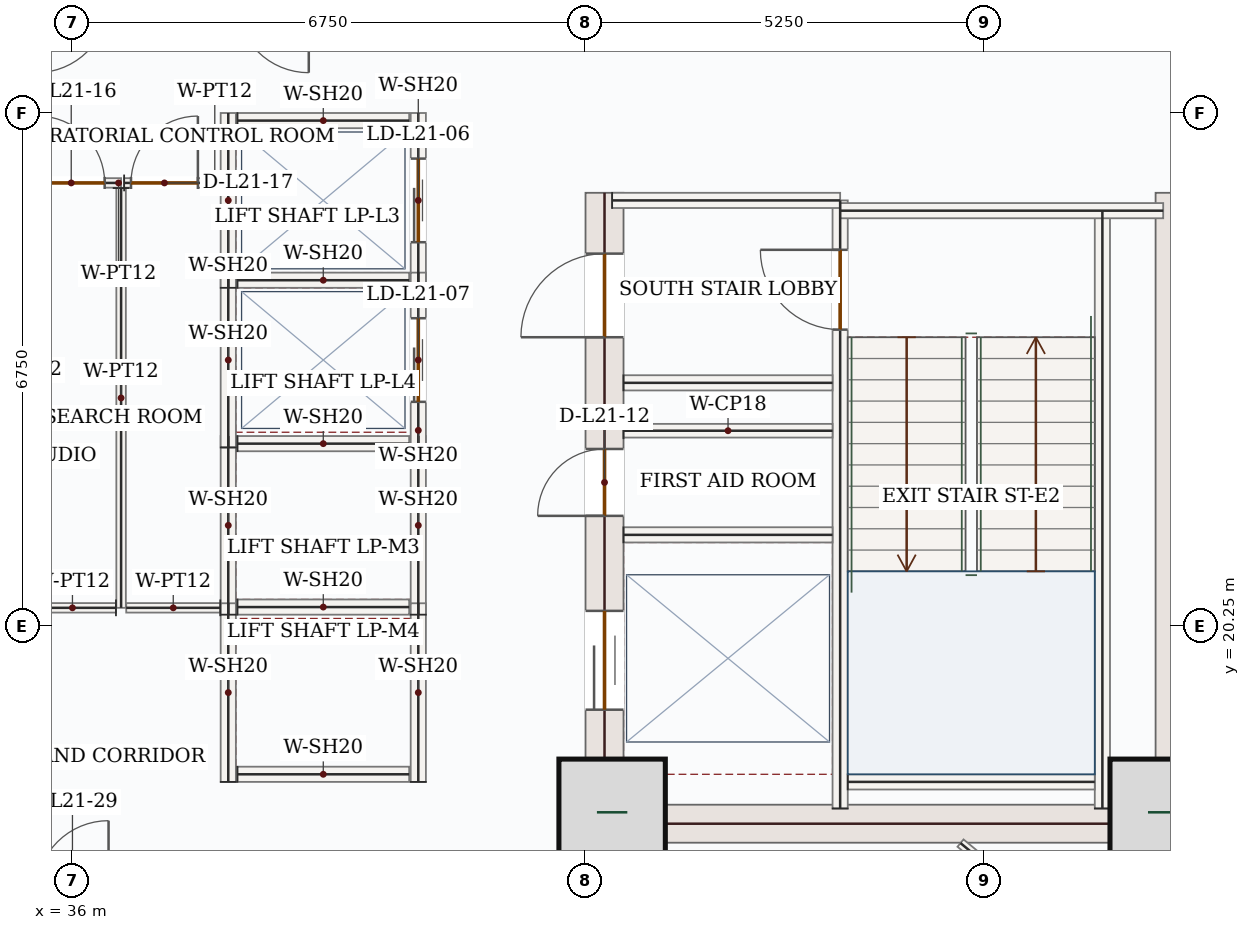
"""IFC4 building model, lengths in metres.
Left out: names, types, materials, properties, quantities, classifications, styles, units other than length and angle.
Written with IfcOpenShell. Run it as: python <this file> out.ifc"""

import sys

from ifc_helpers import new_model, si_unit, direction, frame, frame_2d, origin, origin_2d, place, context, subcontext, project, spatial, rectangle, extrude, source, transform, mapped, element, fill, save


model = new_model("IFC4")
c1 = context("Model", 3, precision=1e-05, world=origin(), true_north=direction((0.0, 1.0)))
c2 = subcontext(c1, "Body", "Model", "MODEL_VIEW")
j1 = project(units=[si_unit("LENGTHUNIT", "METRE"), si_unit("PLANEANGLEUNIT", "RADIAN")], contexts=[c1])
p1 = place(None, origin())
s1 = spatial("IfcSite", under=j1, at=p1, CompositionType="ELEMENT")
p2 = place(p1, origin())
s2 = spatial("IfcBuilding", under=s1, at=p2, CompositionType="ELEMENT")
p3 = place(p2, frame((0.0, 0.0, 96.3)))
s3 = spatial("IfcBuildingStorey", under=s2, at=p3, CompositionType="ELEMENT", Elevation=96.3)
p4 = place(p3, frame((43.0, 17.4, 0.0), z_axis=(0.0, 0.0, 1.0), x_axis=(0.0, 1.0, 0.0)))
e1 = element("IfcWall", 1, at=p4, inside=s3, PredefinedType="SHEAR", context=c2, shape_type="SweptSolid", body=[
    extrude(rectangle(XDim=8.55, YDim=0.5, at=frame_2d((4.275, 0.0))), origin(), (0.0, 0.0, 1.0), 3.95),
])
p5 = place(p4, frame((6.65, 0.0, 0.0)))
e2 = element("IfcOpeningElement", 2, at=p5, cuts=e1, PredefinedType="OPENING", context=c2, shape_type="SweptSolid", body=[
    extrude(rectangle(XDim=1.1, YDim=2.2, at=frame_2d((0.55, 1.1))), frame((0.0, 0.26, 0.0), z_axis=(0.0, -1.0, 0.0), x_axis=(1.0, 0.0, 0.0)), (0.0, 0.0, 1.0), 0.52),
])
p6 = place(p4, frame((1.75, 0.0, 0.0)))
e3 = element("IfcOpeningElement", 3, at=p6, cuts=e1, PredefinedType="OPENING", context=c2, shape_type="SweptSolid", body=[
    extrude(rectangle(XDim=1.3, YDim=2.2, at=frame_2d((0.65, 1.1))), frame((0.0, 0.26, 0.0), z_axis=(0.0, -1.0, 0.0), x_axis=(1.0, 0.0, 0.0)), (0.0, 0.0, 1.0), 0.52),
])
p7 = place(p4, frame((4.3, 0.0, 0.0)))
e4 = element("IfcOpeningElement", 4, at=p7, cuts=e1, PredefinedType="OPENING", context=c2, shape_type="SweptSolid", body=[
    extrude(rectangle(XDim=0.88, YDim=2.1, at=frame_2d((0.44, 1.05))), frame((0.0, 0.26, 0.0), z_axis=(0.0, -1.0, 0.0), x_axis=(1.0, 0.0, 0.0)), (0.0, 0.0, 1.0), 0.52),
])
m1 = source(origin(), c2, "Body", "SweptSolid", [
    extrude(rectangle(XDim=8.55, YDim=0.5, at=frame_2d((4.275, 0.0))), origin(), (0.0, 0.0, 1.0), 3.95),
])
p8 = place(p3, frame((50.5, 17.4, 0.0), z_axis=(0.0, 0.0, 1.0), x_axis=(0.0, 1.0, 0.0)))
e5 = element("IfcWall", 5, at=p8, inside=s3, PredefinedType="SHEAR", context=c2, shape_type="MappedRepresentation", body=[
    mapped(m1, transform((0.0, 0.0, 0.0), x_axis=(1.0, 0.0, 0.0), y_axis=(0.0, 1.0, 0.0), z_axis=(0.0, 0.0, 1.0), scale=1.0)),
])
m2 = source(origin(), c2, "Body", "SweptSolid", [
    extrude(rectangle(XDim=7.0, YDim=0.5, at=frame_2d((3.5, 0.0))), origin(), (0.0, 0.0, 1.0), 3.95),
])
p9 = place(p3, frame((43.25, 17.65, 0.0), z_axis=(0.0, 0.0, 1.0), x_axis=(1.0, 0.0, 0.0)))
e6 = element("IfcWall", 6, at=p9, inside=s3, PredefinedType="SHEAR", context=c2, shape_type="MappedRepresentation", body=[
    mapped(m2, transform((0.0, 0.0, 0.0), x_axis=(1.0, 0.0, 0.0), y_axis=(0.0, 1.0, 0.0), z_axis=(0.0, 0.0, 1.0), scale=1.0)),
])
m3 = source(origin(), c2, "Body", "SweptSolid", [
    extrude(rectangle(XDim=1.4, YDim=1.4, at=origin_2d()), origin(), (0.0, 0.0, 1.0), 4.2),
])
for number, where, z_axis, x_axis in (
    (7, (43.1, 17.8, 0.0), (0.0, 0.0, 1.0), (1.0, 0.0, 0.0)),
    (8, (50.35, 17.8, 0.0), (0.0, 0.0, 1.0), (1.0, 0.0, 0.0)),
):
    element("IfcColumn", number, at=place(p3, frame(where, z_axis=z_axis, x_axis=x_axis)), inside=s3, PredefinedType="COLUMN", context=c2, shape_type="MappedRepresentation", body=[
        mapped(m3, transform((0.0, 0.0, 0.0), x_axis=(1.0, 0.0, 0.0), y_axis=(0.0, 1.0, 0.0), z_axis=(0.0, 0.0, 1.0), scale=1.0)),
    ])
m4 = source(origin(), c2, "Body", "SweptSolid", [
    extrude(rectangle(XDim=5.258, YDim=0.32, at=frame_2d((2.629, 0.0))), origin(), (0.0, 0.0, 1.0), 3.95),
])
p10 = place(p3, frame((53.06, 18.458, 0.0), z_axis=(0.0, 0.0, 1.0), x_axis=(-0.707106781187, -0.707106781187, 0.0)))
e9 = element("IfcWall", 9, at=p10, inside=s3, PredefinedType="SOLIDWALL", context=c2, shape_type="MappedRepresentation", body=[
    mapped(m4, transform((0.0, 0.0, 0.0), x_axis=(1.0, 0.0, 0.0), y_axis=(0.0, 1.0, 0.0), z_axis=(0.0, 0.0, 1.0), scale=1.0)),
])
m5 = source(origin(), c2, "Body", "SweptSolid", [
    extrude(rectangle(XDim=7.87, YDim=0.2, at=frame_2d((3.935, 0.0))), origin(), (0.0, 0.0, 1.0), 3.95),
])
p11 = place(p3, frame((49.55, 17.85, 0.0), z_axis=(0.0, 0.0, 1.0), x_axis=(0.0, 1.0, 0.0)))
e10 = element("IfcWall", 10, at=p11, inside=s3, PredefinedType="SOLIDWALL", context=c2, shape_type="MappedRepresentation", body=[
    mapped(m5, transform((0.0, 0.0, 0.0), x_axis=(1.0, 0.0, 0.0), y_axis=(0.0, 1.0, 0.0), z_axis=(0.0, 0.0, 1.0), scale=1.0)),
])
p12 = place(p3, frame((46.1, 17.85, 0.0), z_axis=(0.0, 0.0, 1.0), x_axis=(0.0, 1.0, 0.0)))
e11 = element("IfcWall", 11, at=p12, inside=s3, PredefinedType="SOLIDWALL", context=c2, shape_type="SweptSolid", body=[
    extrude(rectangle(XDim=8.0, YDim=0.2, at=frame_2d((4.0, 0.0))), origin(), (0.0, 0.0, 1.0), 3.95),
])
p13 = place(p12, frame((6.3, 0.0, 0.0)))
e12 = element("IfcOpeningElement", 12, at=p13, cuts=e11, PredefinedType="OPENING", context=c2, shape_type="SweptSolid", body=[
    extrude(rectangle(XDim=1.05, YDim=2.15, at=frame_2d((0.525, 1.075))), frame((0.0, 0.11, 0.0), z_axis=(0.0, -1.0, 0.0), x_axis=(1.0, 0.0, 0.0)), (0.0, 0.0, 1.0), 0.22),
])
m6 = source(origin(), c2, "Body", "SweptSolid", [
    extrude(rectangle(XDim=3.0, YDim=0.2, at=frame_2d((1.5, 0.0))), origin(), (0.0, 0.0, 1.0), 3.95),
])
p14 = place(p3, frame((43.1, 25.85, 0.0), z_axis=(0.0, 0.0, 1.0), x_axis=(1.0, 0.0, 0.0)))
e13 = element("IfcWall", 13, at=p14, inside=s3, PredefinedType="SOLIDWALL", context=c2, shape_type="MappedRepresentation", body=[
    mapped(m6, transform((0.0, 0.0, 0.0), x_axis=(1.0, 0.0, 0.0), y_axis=(0.0, 1.0, 0.0), z_axis=(0.0, 0.0, 1.0), scale=1.0)),
])
m7 = source(origin(), c2, "Body", "SweptSolid", [
    extrude(rectangle(XDim=4.25, YDim=0.2, at=frame_2d((2.125, 0.0))), origin(), (0.0, 0.0, 1.0), 3.95),
])
p15 = place(p3, frame((46.1, 25.715, 0.0), z_axis=(0.0, 0.0, 1.0), x_axis=(1.0, 0.0, 0.0)))
e14 = element("IfcWall", 14, at=p15, inside=s3, PredefinedType="SOLIDWALL", context=c2, shape_type="MappedRepresentation", body=[
    mapped(m7, transform((0.0, 0.0, 0.0), x_axis=(1.0, 0.0, 0.0), y_axis=(0.0, 1.0, 0.0), z_axis=(0.0, 0.0, 1.0), scale=1.0)),
])
m8 = source(origin(), c2, "Body", "SweptSolid", [
    extrude(rectangle(XDim=3.25, YDim=0.2, at=frame_2d((1.625, 0.0))), origin(), (0.0, 0.0, 1.0), 3.95),
])
p16 = place(p3, frame((46.2, 18.2, 0.0), z_axis=(0.0, 0.0, 1.0), x_axis=(1.0, 0.0, 0.0)))
e15 = element("IfcWall", 15, at=p16, inside=s3, PredefinedType="SOLIDWALL", context=c2, shape_type="MappedRepresentation", body=[
    mapped(m8, transform((0.0, 0.0, 0.0), x_axis=(1.0, 0.0, 0.0), y_axis=(0.0, 1.0, 0.0), z_axis=(0.0, 0.0, 1.0), scale=1.0)),
])
m9 = source(origin(), c2, "Body", "SweptSolid", [
    extrude(rectangle(XDim=2.75, YDim=0.2, at=frame_2d((1.375, 0.0))), origin(), (0.0, 0.0, 1.0), 3.95),
])
for number, where, z_axis, x_axis in (
    (16, (43.25, 23.45, 0.0), (0.0, 0.0, 1.0), (1.0, 0.0, 0.0)),
    (17, (43.25, 21.45, 0.0), (0.0, 0.0, 1.0), (1.0, 0.0, 0.0)),
):
    element("IfcWall", number, at=place(p3, frame(where, z_axis=z_axis, x_axis=x_axis)), inside=s3, PredefinedType="SOLIDWALL", context=c2, shape_type="MappedRepresentation", body=[
        mapped(m9, transform((0.0, 0.0, 0.0), x_axis=(1.0, 0.0, 0.0), y_axis=(0.0, 1.0, 0.0), z_axis=(0.0, 0.0, 1.0), scale=1.0)),
    ])
m10 = source(origin(), c2, "Body", "SweptSolid", [
    extrude(rectangle(XDim=2.75, YDim=0.18, at=frame_2d((1.375, 0.0))), origin(), (0.0, 0.0, 1.0), 3.95),
])
p17 = place(p3, frame((43.25, 22.82, 0.0), z_axis=(0.0, 0.0, 1.0), x_axis=(1.0, 0.0, 0.0)))
e18 = element("IfcWall", 18, at=p17, inside=s3, PredefinedType="PARTITIONING", context=c2, shape_type="MappedRepresentation", body=[
    mapped(m10, transform((0.0, 0.0, 0.0), x_axis=(1.0, 0.0, 0.0), y_axis=(0.0, 1.0, 0.0), z_axis=(0.0, 0.0, 1.0), scale=1.0)),
])
m11 = source(origin(), c2, "Body", "SweptSolid", [
    extrude(rectangle(XDim=2.35, YDim=0.2, at=frame_2d((1.175, 0.0))), origin(), (0.0, 0.0, 1.0), 3.95),
])
for number, where, z_axis, x_axis in (
    (19, (38.05, 20.4, 0.0), (0.0, 0.0, 1.0), (0.0, 1.0, 0.0)),
    (20, (40.55, 20.4, 0.0), (0.0, 0.0, 1.0), (0.0, 1.0, 0.0)),
):
    element("IfcWall", number, at=place(p3, frame(where, z_axis=z_axis, x_axis=x_axis)), inside=s3, PredefinedType="SOLIDWALL", context=c2, shape_type="MappedRepresentation", body=[
        mapped(m11, transform((0.0, 0.0, 0.0), x_axis=(1.0, 0.0, 0.0), y_axis=(0.0, 1.0, 0.0), z_axis=(0.0, 0.0, 1.0), scale=1.0)),
    ])
m12 = source(origin(), c2, "Body", "SweptSolid", [
    extrude(rectangle(XDim=2.26, YDim=0.2, at=frame_2d((1.13, 0.0))), origin(), (0.0, 0.0, 1.0), 3.95),
])
for number, where, z_axis, x_axis in (
    (21, (38.17, 20.5, 0.0), (0.0, 0.0, 1.0), (1.0, 0.0, 0.0)),
    (22, (38.17, 22.65, 0.0), (0.0, 0.0, 1.0), (1.0, 0.0, 0.0)),
):
    element("IfcWall", number, at=place(p3, frame(where, z_axis=z_axis, x_axis=x_axis)), inside=s3, PredefinedType="SOLIDWALL", context=c2, shape_type="MappedRepresentation", body=[
        mapped(m12, transform((0.0, 0.0, 0.0), x_axis=(1.0, 0.0, 0.0), y_axis=(0.0, 1.0, 0.0), z_axis=(0.0, 0.0, 1.0), scale=1.0)),
    ])
for number, where, z_axis, x_axis in (
    (23, (38.05, 18.2, 0.0), (0.0, 0.0, 1.0), (0.0, 1.0, 0.0)),
    (24, (40.55, 18.2, 0.0), (0.0, 0.0, 1.0), (0.0, 1.0, 0.0)),
):
    element("IfcWall", number, at=place(p3, frame(where, z_axis=z_axis, x_axis=x_axis)), inside=s3, PredefinedType="SOLIDWALL", context=c2, shape_type="MappedRepresentation", body=[
        mapped(m11, transform((0.0, 0.0, 0.0), x_axis=(1.0, 0.0, 0.0), y_axis=(0.0, 1.0, 0.0), z_axis=(0.0, 0.0, 1.0), scale=1.0)),
    ])
p18 = place(p3, frame((38.17, 18.3, 0.0), z_axis=(0.0, 0.0, 1.0), x_axis=(1.0, 0.0, 0.0)))
e25 = element("IfcWall", 25, at=p18, inside=s3, PredefinedType="SOLIDWALL", context=c2, shape_type="MappedRepresentation", body=[
    mapped(m12, transform((0.0, 0.0, 0.0), x_axis=(1.0, 0.0, 0.0), y_axis=(0.0, 1.0, 0.0), z_axis=(0.0, 0.0, 1.0), scale=1.0)),
])
m13 = source(origin(), c2, "Body", "SweptSolid", [
    extrude(rectangle(XDim=2.3, YDim=0.2, at=frame_2d((1.15, 0.0))), origin(), (0.0, 0.0, 1.0), 3.95),
])
p19 = place(p3, frame((38.05, 24.7, 0.0), z_axis=(0.0, 0.0, 1.0), x_axis=(0.0, 1.0, 0.0)))
e26 = element("IfcWall", 26, at=p19, inside=s3, PredefinedType="SOLIDWALL", context=c2, shape_type="MappedRepresentation", body=[
    mapped(m13, transform((0.0, 0.0, 0.0), x_axis=(1.0, 0.0, 0.0), y_axis=(0.0, 1.0, 0.0), z_axis=(0.0, 0.0, 1.0), scale=1.0)),
])
p20 = place(p3, frame((40.55, 24.7, 0.0), z_axis=(0.0, 0.0, 1.0), x_axis=(0.0, 1.0, 0.0)))
e27 = element("IfcWall", 27, at=p20, inside=s3, PredefinedType="SOLIDWALL", context=c2, shape_type="SweptSolid", body=[
    extrude(rectangle(XDim=2.3, YDim=0.2, at=frame_2d((1.15, 0.0))), origin(), (0.0, 0.0, 1.0), 3.95),
])
p21 = place(p20, frame((0.6, 0.0, 0.0)))
e28 = element("IfcOpeningElement", 28, at=p21, cuts=e27, PredefinedType="OPENING", context=c2, shape_type="SweptSolid", body=[
    extrude(rectangle(XDim=1.1, YDim=2.15, at=frame_2d((0.55, 1.075))), frame((0.0, 0.11, 0.0), z_axis=(0.0, -1.0, 0.0), x_axis=(1.0, 0.0, 0.0)), (0.0, 0.0, 1.0), 0.22),
])
for number, where, z_axis, x_axis in (
    (29, (38.17, 24.8, 0.0), (0.0, 0.0, 1.0), (1.0, 0.0, 0.0)),
    (30, (38.17, 26.9, 0.0), (0.0, 0.0, 1.0), (1.0, 0.0, 0.0)),
):
    element("IfcWall", number, at=place(p3, frame(where, z_axis=z_axis, x_axis=x_axis)), inside=s3, PredefinedType="SOLIDWALL", context=c2, shape_type="MappedRepresentation", body=[
        mapped(m12, transform((0.0, 0.0, 0.0), x_axis=(1.0, 0.0, 0.0), y_axis=(0.0, 1.0, 0.0), z_axis=(0.0, 0.0, 1.0), scale=1.0)),
    ])
m14 = source(origin(), c2, "Body", "SweptSolid", [
    extrude(rectangle(XDim=2.3, YDim=0.2, at=frame_2d((1.15, 0.0))), origin(), (0.0, 0.0, 1.0), 3.95),
])
p22 = place(p3, frame((38.05, 22.6, 0.0), z_axis=(0.0, 0.0, 1.0), x_axis=(0.0, 1.0, 0.0)))
e31 = element("IfcWall", 31, at=p22, inside=s3, PredefinedType="SOLIDWALL", context=c2, shape_type="MappedRepresentation", body=[
    mapped(m14, transform((0.0, 0.0, 0.0), x_axis=(1.0, 0.0, 0.0), y_axis=(0.0, 1.0, 0.0), z_axis=(0.0, 0.0, 1.0), scale=1.0)),
])
p23 = place(p3, frame((40.55, 22.6, 0.0), z_axis=(0.0, 0.0, 1.0), x_axis=(0.0, 1.0, 0.0)))
e32 = element("IfcWall", 32, at=p23, inside=s3, PredefinedType="SOLIDWALL", context=c2, shape_type="SweptSolid", body=[
    extrude(rectangle(XDim=2.3, YDim=0.2, at=frame_2d((1.15, 0.0))), origin(), (0.0, 0.0, 1.0), 3.95),
])
p24 = place(p23, frame((0.6, 0.0, 0.0)))
e33 = element("IfcOpeningElement", 33, at=p24, cuts=e32, PredefinedType="OPENING", context=c2, shape_type="SweptSolid", body=[
    extrude(rectangle(XDim=1.1, YDim=2.15, at=frame_2d((0.55, 1.075))), frame((0.0, 0.11, 0.0), z_axis=(0.0, -1.0, 0.0), x_axis=(1.0, 0.0, 0.0)), (0.0, 0.0, 1.0), 0.22),
])
p25 = place(p3, frame((35.427, 26.08, 0.0), z_axis=(0.0, 0.0, 1.0), x_axis=(1.0, 0.0, 0.0)))
e34 = element("IfcWall", 34, at=p25, inside=s3, PredefinedType="PARTITIONING", context=c2, shape_type="SweptSolid", body=[
    extrude(rectangle(XDim=1.212, YDim=0.125, at=frame_2d((0.606, 0.0))), origin(), (0.0, 0.0, 1.0), 3.95),
])
p26 = place(p25, frame((0.116, 0.0, 0.0)))
e35 = element("IfcOpeningElement", 35, at=p26, cuts=e34, PredefinedType="OPENING", context=c2, shape_type="SweptSolid", body=[
    extrude(rectangle(XDim=0.88, YDim=2.1, at=frame_2d((0.44, 1.05))), frame((0.0, 0.073, 0.0), z_axis=(0.0, -1.0, 0.0), x_axis=(1.0, 0.0, 0.0)), (0.0, 0.0, 1.0), 0.145),
])
m15 = source(origin(), c2, "Body", "SweptSolid", [
    extrude(rectangle(XDim=5.522, YDim=0.125, at=frame_2d((2.761, 0.0))), origin(), (0.0, 0.0, 1.0), 3.95),
])
p27 = place(p3, frame((36.64, 26.012, 0.0), z_axis=(0.0, 0.0, 1.0), x_axis=(0.0, -1.0, 0.0)))
e36 = element("IfcWall", 36, at=p27, inside=s3, PredefinedType="PARTITIONING", context=c2, shape_type="MappedRepresentation", body=[
    mapped(m15, transform((0.0, 0.0, 0.0), x_axis=(1.0, 0.0, 0.0), y_axis=(0.0, 1.0, 0.0), z_axis=(0.0, 0.0, 1.0), scale=1.0)),
])
m16 = source(origin(), c2, "Body", "SweptSolid", [
    extrude(rectangle(XDim=1.145, YDim=0.125, at=frame_2d((0.573, 0.0))), origin(), (0.0, 0.0, 1.0), 3.95),
])
p28 = place(p3, frame((36.573, 20.49, 0.0), z_axis=(0.0, 0.0, 1.0), x_axis=(-1.0, 0.0, 0.0)))
e37 = element("IfcWall", 37, at=p28, inside=s3, PredefinedType="PARTITIONING", context=c2, shape_type="MappedRepresentation", body=[
    mapped(m16, transform((0.0, 0.0, 0.0), x_axis=(1.0, 0.0, 0.0), y_axis=(0.0, 1.0, 0.0), z_axis=(0.0, 0.0, 1.0), scale=1.0)),
])
p29 = place(p3, frame((36.68, 26.08, 0.0), z_axis=(0.0, 0.0, 1.0), x_axis=(1.0, 0.0, 0.0)))
e38 = element("IfcWall", 38, at=p29, inside=s3, PredefinedType="PARTITIONING", context=c2, shape_type="SweptSolid", body=[
    extrude(rectangle(XDim=1.265, YDim=0.125, at=frame_2d((0.633, 0.0))), origin(), (0.0, 0.0, 1.0), 3.95),
])
p30 = place(p29, frame((0.09, 0.0, 0.0)))
e39 = element("IfcOpeningElement", 39, at=p30, cuts=e38, PredefinedType="OPENING", context=c2, shape_type="SweptSolid", body=[
    extrude(rectangle(XDim=0.88, YDim=2.1, at=frame_2d((0.44, 1.05))), frame((0.0, 0.073, 0.0), z_axis=(0.0, -1.0, 0.0), x_axis=(1.0, 0.0, 0.0)), (0.0, 0.0, 1.0), 0.145),
])
m17 = source(origin(), c2, "Body", "SweptSolid", [
    extrude(rectangle(XDim=1.238, YDim=0.125, at=frame_2d((0.619, 0.0))), origin(), (0.0, 0.0, 1.0), 3.95),
])
p31 = place(p3, frame((37.945, 20.49, 0.0), z_axis=(0.0, 0.0, 1.0), x_axis=(-1.0, 0.0, 0.0)))
e40 = element("IfcWall", 40, at=p31, inside=s3, PredefinedType="PARTITIONING", context=c2, shape_type="MappedRepresentation", body=[
    mapped(m17, transform((0.0, 0.0, 0.0), x_axis=(1.0, 0.0, 0.0), y_axis=(0.0, 1.0, 0.0), z_axis=(0.0, 0.0, 1.0), scale=1.0)),
])
m18 = source(origin(), c2, "Body", "SweptSolid", [
    extrude(rectangle(XDim=2.898, YDim=0.125, at=frame_2d((1.449, 0.0))), origin(), (0.0, 0.0, 1.0), 3.95),
])
p32 = place(p3, frame((49.917, 15.549, 0.0), z_axis=(0.0, 0.0, 1.0), x_axis=(-0.770859236659, 0.637005523726, 0.0)))
e41 = element("IfcWall", 41, at=p32, inside=s3, PredefinedType="PARTITIONING", context=c2, shape_type="MappedRepresentation", body=[
    mapped(m18, transform((0.0, 0.0, 0.0), x_axis=(1.0, 0.0, 0.0), y_axis=(0.0, 1.0, 0.0), z_axis=(0.0, 0.0, 1.0), scale=1.0)),
])
m19 = source(origin(), c2, "Body", "SweptSolid", [
    extrude(rectangle(XDim=1.05, YDim=2.15, at=frame_2d((0.525, 1.075))), frame((0.0, 0.025, 0.0), z_axis=(0.0, -1.0, 0.0), x_axis=(1.0, 0.0, 0.0)), (0.0, 0.0, 1.0), 0.05),
])
p33 = place(p13, origin())
e42 = element("IfcDoor", 42, at=p33, inside=s3, OperationType="SINGLE_SWING_RIGHT", PredefinedType="DOOR", context=c2, shape_type="MappedRepresentation", body=[
    mapped(m19, transform((0.0, 0.0, 0.0), x_axis=(1.0, 0.0, 0.0), y_axis=(0.0, 1.0, 0.0), z_axis=(0.0, 0.0, 1.0), scale=1.0)),
])
fill(e12, e42)
m20 = source(origin(), c2, "Body", "SweptSolid", [
    extrude(rectangle(XDim=1.1, YDim=2.2, at=frame_2d((0.55, 1.1))), frame((0.0, 0.025, 0.0), z_axis=(0.0, -1.0, 0.0), x_axis=(1.0, 0.0, 0.0)), (0.0, 0.0, 1.0), 0.05),
])
p34 = place(p5, origin())
e43 = element("IfcDoor", 43, at=p34, inside=s3, OperationType="SINGLE_SWING_LEFT", PredefinedType="DOOR", context=c2, shape_type="MappedRepresentation", body=[
    mapped(m20, transform((0.0, 0.0, 0.0), x_axis=(1.0, 0.0, 0.0), y_axis=(0.0, 1.0, 0.0), z_axis=(0.0, 0.0, 1.0), scale=1.0)),
])
fill(e2, e43)
m21 = source(origin(), c2, "Body", "SweptSolid", [
    extrude(rectangle(XDim=1.3, YDim=2.2, at=frame_2d((0.65, 1.1))), frame((0.0, 0.025, 0.0), z_axis=(0.0, -1.0, 0.0), x_axis=(1.0, 0.0, 0.0)), (0.0, 0.0, 1.0), 0.05),
])
p35 = place(p6, origin())
e44 = element("IfcDoor", 44, at=p35, inside=s3, OperationType="DOUBLE_DOOR_SLIDING", PredefinedType="DOOR", context=c2, shape_type="MappedRepresentation", body=[
    mapped(m21, transform((0.0, 0.0, 0.0), x_axis=(1.0, 0.0, 0.0), y_axis=(0.0, 1.0, 0.0), z_axis=(0.0, 0.0, 1.0), scale=1.0)),
])
fill(e3, e44)
m22 = source(origin(), c2, "Body", "SweptSolid", [
    extrude(rectangle(XDim=0.88, YDim=2.1, at=frame_2d((0.44, 1.05))), frame((0.0, 0.025, 0.0), z_axis=(0.0, -1.0, 0.0), x_axis=(1.0, 0.0, 0.0)), (0.0, 0.0, 1.0), 0.05),
])
p36 = place(p7, origin())
e45 = element("IfcDoor", 45, at=p36, inside=s3, OperationType="SINGLE_SWING_LEFT", PredefinedType="DOOR", context=c2, shape_type="MappedRepresentation", body=[
    mapped(m22, transform((0.0, 0.0, 0.0), x_axis=(1.0, 0.0, 0.0), y_axis=(0.0, 1.0, 0.0), z_axis=(0.0, 0.0, 1.0), scale=1.0)),
])
fill(e4, e45)
m23 = source(origin(), c2, "Body", "SweptSolid", [
    extrude(rectangle(XDim=1.1, YDim=2.15, at=frame_2d((0.55, 1.075))), frame((0.0, 0.025, 0.0), z_axis=(0.0, -1.0, 0.0), x_axis=(1.0, 0.0, 0.0)), (0.0, 0.0, 1.0), 0.05),
])
p37 = place(p21, origin())
e46 = element("IfcDoor", 46, at=p37, inside=s3, OperationType="DOUBLE_DOOR_SLIDING", PredefinedType="DOOR", context=c2, shape_type="MappedRepresentation", body=[
    mapped(m23, transform((0.0, 0.0, 0.0), x_axis=(1.0, 0.0, 0.0), y_axis=(0.0, 1.0, 0.0), z_axis=(0.0, 0.0, 1.0), scale=1.0)),
])
fill(e28, e46)
p38 = place(p24, origin())
e47 = element("IfcDoor", 47, at=p38, inside=s3, OperationType="DOUBLE_DOOR_SLIDING", PredefinedType="DOOR", context=c2, shape_type="MappedRepresentation", body=[
    mapped(m23, transform((0.0, 0.0, 0.0), x_axis=(1.0, 0.0, 0.0), y_axis=(0.0, 1.0, 0.0), z_axis=(0.0, 0.0, 1.0), scale=1.0)),
])
fill(e33, e47)
p39 = place(p26, origin())
e48 = element("IfcDoor", 48, at=p39, inside=s3, OperationType="SINGLE_SWING_LEFT", PredefinedType="DOOR", context=c2, shape_type="MappedRepresentation", body=[
    mapped(m22, transform((0.0, 0.0, 0.0), x_axis=(1.0, 0.0, 0.0), y_axis=(0.0, 1.0, 0.0), z_axis=(0.0, 0.0, 1.0), scale=1.0)),
])
fill(e35, e48)
p40 = place(p30, origin())
e49 = element("IfcDoor", 49, at=p40, inside=s3, OperationType="SINGLE_SWING_RIGHT", PredefinedType="DOOR", context=c2, shape_type="MappedRepresentation", body=[
    mapped(m22, transform((0.0, 0.0, 0.0), x_axis=(1.0, 0.0, 0.0), y_axis=(0.0, 1.0, 0.0), z_axis=(0.0, 0.0, 1.0), scale=1.0)),
])
fill(e39, e49)
save(model, sys.argv[1])
